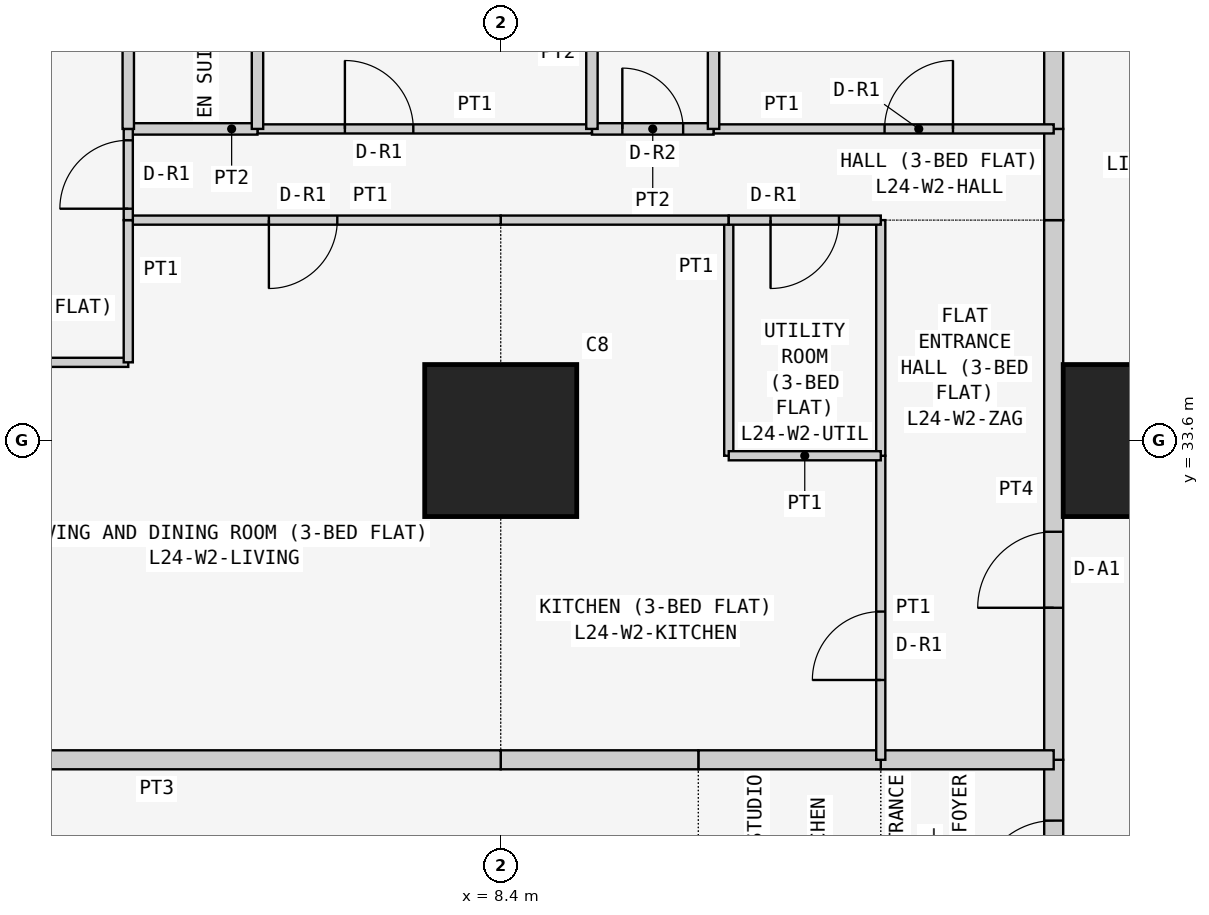
"""IFC4 building model, lengths in metres.
Left out: names, types, materials, properties, quantities, classifications, styles, units other than length and angle.
Written with IfcOpenShell. Run it as: python <this file> out.ifc"""

import sys

from ifc_helpers import new_model, si_unit, direction, frame, frame_2d, origin, origin_2d, place, context, subcontext, project, spatial, rectangle, extrude, element, fill, save


model = new_model("IFC4")
c1 = context("Model", 3, precision=1e-05, world=origin(), true_north=direction((0.0, 1.0)))
c2 = subcontext(c1, "Body", "Model", "MODEL_VIEW")
j1 = project(units=[si_unit("LENGTHUNIT", "METRE"), si_unit("PLANEANGLEUNIT", "RADIAN")], contexts=[c1])
p1 = place(None, origin())
s1 = spatial("IfcSite", under=j1, at=p1, CompositionType="ELEMENT")
p2 = place(p1, origin())
s2 = spatial("IfcBuilding", under=s1, at=p2, CompositionType="ELEMENT")
p3 = place(p2, frame((0.0, 0.0, 95.7)))
s3 = spatial("IfcBuildingStorey", under=s2, at=p3, CompositionType="ELEMENT", Elevation=95.7)
for number, where, z_axis, x_axis in (
    (1, (8.4, 33.6, 0.0), (0.0, 0.0, 1.0), (1.0, 0.0, 0.0)),
    (2, (16.8, 33.6, 0.0), (0.0, 0.0, 1.0), (1.0, 0.0, 0.0)),
):
    element("IfcColumn", number, at=place(p3, frame(where, z_axis=z_axis, x_axis=x_axis)), inside=s3, PredefinedType="COLUMN", context=c2, shape_type="SweptSolid", body=[
        extrude(rectangle(XDim=2.0, YDim=2.0, at=origin_2d()), origin(), (0.0, 0.0, 1.0), 3.6),
    ])
p4 = place(p3, frame((15.675, 26.8, 0.0), z_axis=(0.0, 0.0, 1.0), x_axis=(0.0, 1.0, 0.0)))
e3 = element("IfcWall", 3, at=p4, inside=s3, PredefinedType="PARTITIONING", context=c2, shape_type="SweptSolid", body=[
    extrude(rectangle(XDim=2.6, YDim=0.25, at=frame_2d((1.3, 0.0))), origin(), (0.0, 0.0, 1.0), 3.45),
])
p5 = place(p4, frame((0.8, 0.0, 0.0)))
e4 = element("IfcOpeningElement", 4, at=p5, cuts=e3, PredefinedType="OPENING", context=c2, shape_type="SweptSolid", body=[
    extrude(rectangle(XDim=1.0, YDim=2.1, at=frame_2d((0.5, 1.05))), frame((0.0, 0.135, 0.0), z_axis=(0.0, -1.0, 0.0), x_axis=(1.0, 0.0, 0.0)), (0.0, 0.0, 1.0), 0.27),
])
p6 = place(p3, frame((15.675, 29.4, 0.0), z_axis=(0.0, 0.0, 1.0), x_axis=(0.0, 1.0, 0.0)))
e5 = element("IfcWall", 5, at=p6, inside=s3, PredefinedType="PARTITIONING", context=c2, shape_type="SweptSolid", body=[
    extrude(rectangle(XDim=7.1, YDim=0.25, at=frame_2d((3.55, 0.0))), origin(), (0.0, 0.0, 1.0), 3.45),
])
p7 = place(p6, frame((2.0, 0.0, 0.0)))
e6 = element("IfcOpeningElement", 6, at=p7, cuts=e5, PredefinedType="OPENING", context=c2, shape_type="SweptSolid", body=[
    extrude(rectangle(XDim=1.0, YDim=2.1, at=frame_2d((0.5, 1.05))), frame((0.0, 0.135, 0.0), z_axis=(0.0, -1.0, 0.0), x_axis=(1.0, 0.0, 0.0)), (0.0, 0.0, 1.0), 0.27),
])
p8 = place(p3, frame((15.675, 36.5, 0.0), z_axis=(0.0, 0.0, 1.0), x_axis=(0.0, 1.0, 0.0)))
e7 = element("IfcWall", 7, at=p8, inside=s3, PredefinedType="PARTITIONING", context=c2, shape_type="SweptSolid", body=[
    extrude(rectangle(XDim=1.2, YDim=0.25, at=frame_2d((0.6, 0.0))), origin(), (0.0, 0.0, 1.0), 3.45),
])
p9 = place(p3, frame((15.675, 37.7, 0.0), z_axis=(0.0, 0.0, 1.0), x_axis=(0.0, 1.0, 0.0)))
e8 = element("IfcWall", 8, at=p9, inside=s3, PredefinedType="PARTITIONING", context=c2, shape_type="SweptSolid", body=[
    extrude(rectangle(XDim=5.0, YDim=0.25, at=frame_2d((2.5, 0.0))), origin(), (0.0, 0.0, 1.0), 3.45),
])
p10 = place(p3, frame((15.675, 29.4, 0.0), z_axis=(0.0, 0.0, 1.0), x_axis=(-1.0, 0.0, 0.0)))
e9 = element("IfcWall", 9, at=p10, inside=s3, PredefinedType="PARTITIONING", context=c2, shape_type="SweptSolid", body=[
    extrude(rectangle(XDim=2.275, YDim=0.25, at=frame_2d((1.138, 0.0))), origin(), (0.0, 0.0, 1.0), 3.45),
])
p11 = place(p3, frame((13.4, 29.4, 0.0), z_axis=(0.0, 0.0, 1.0), x_axis=(-1.0, 0.0, 0.0)))
e10 = element("IfcWall", 10, at=p11, inside=s3, PredefinedType="PARTITIONING", context=c2, shape_type="SweptSolid", body=[
    extrude(rectangle(XDim=2.4, YDim=0.25, at=frame_2d((1.2, 0.0))), origin(), (0.0, 0.0, 1.0), 3.45),
])
p12 = place(p3, frame((11.0, 29.4, 0.0), z_axis=(0.0, 0.0, 1.0), x_axis=(-1.0, 0.0, 0.0)))
e11 = element("IfcWall", 11, at=p12, inside=s3, PredefinedType="PARTITIONING", context=c2, shape_type="SweptSolid", body=[
    extrude(rectangle(XDim=2.6, YDim=0.25, at=frame_2d((1.3, 0.0))), origin(), (0.0, 0.0, 1.0), 3.45),
])
p13 = place(p3, frame((8.4, 29.4, 0.0), z_axis=(0.0, 0.0, 1.0), x_axis=(-1.0, 0.0, 0.0)))
e12 = element("IfcWall", 12, at=p13, inside=s3, PredefinedType="PARTITIONING", context=c2, shape_type="SweptSolid", body=[
    extrude(rectangle(XDim=9.05, YDim=0.25, at=frame_2d((4.525, 0.0))), origin(), (0.0, 0.0, 1.0), 3.45),
])
p14 = place(p3, frame((13.4, 29.4, 0.0), z_axis=(0.0, 0.0, 1.0), x_axis=(0.0, 1.0, 0.0)))
e13 = element("IfcWall", 13, at=p14, inside=s3, PredefinedType="PARTITIONING", context=c2, shape_type="SweptSolid", body=[
    extrude(rectangle(XDim=4.0, YDim=0.12, at=frame_2d((2.0, 0.0))), origin(), (0.0, 0.0, 1.0), 3.45),
])
p15 = place(p14, frame((1.05, 0.0, 0.0)))
e14 = element("IfcOpeningElement", 14, at=p15, cuts=e13, PredefinedType="OPENING", context=c2, shape_type="SweptSolid", body=[
    extrude(rectangle(XDim=0.9, YDim=2.1, at=frame_2d((0.45, 1.05))), frame((0.0, 0.07, 0.0), z_axis=(0.0, -1.0, 0.0), x_axis=(1.0, 0.0, 0.0)), (0.0, 0.0, 1.0), 0.14),
])
for number, where, z_axis, x_axis in (
    (15, (13.4, 33.4, 0.0), (0.0, 0.0, 1.0), (0.0, 1.0, 0.0)),
    (16, (11.4, 36.5, 0.0), (0.0, 0.0, 1.0), (0.0, -1.0, 0.0)),
):
    element("IfcWall", number, at=place(p3, frame(where, z_axis=z_axis, x_axis=x_axis)), inside=s3, PredefinedType="PARTITIONING", context=c2, shape_type="SweptSolid", body=[
        extrude(rectangle(XDim=3.1, YDim=0.12, at=frame_2d((1.55, 0.0))), origin(), (0.0, 0.0, 1.0), 3.45),
    ])
p16 = place(p3, frame((11.4, 33.4, 0.0), z_axis=(0.0, 0.0, 1.0), x_axis=(1.0, 0.0, 0.0)))
e17 = element("IfcWall", 17, at=p16, inside=s3, PredefinedType="PARTITIONING", context=c2, shape_type="SweptSolid", body=[
    extrude(rectangle(XDim=2.0, YDim=0.12, at=frame_2d((1.0, 0.0))), origin(), (0.0, 0.0, 1.0), 3.45),
])
p17 = place(p3, frame((8.4, 36.5, 0.0), z_axis=(0.0, 0.0, 1.0), x_axis=(1.0, 0.0, 0.0)))
e18 = element("IfcWall", 18, at=p17, inside=s3, PredefinedType="PARTITIONING", context=c2, shape_type="SweptSolid", body=[
    extrude(rectangle(XDim=3.0, YDim=0.12, at=frame_2d((1.5, 0.0))), origin(), (0.0, 0.0, 1.0), 3.45),
])
p18 = place(p3, frame((11.4, 36.5, 0.0), z_axis=(0.0, 0.0, 1.0), x_axis=(1.0, 0.0, 0.0)))
e19 = element("IfcWall", 19, at=p18, inside=s3, PredefinedType="PARTITIONING", context=c2, shape_type="SweptSolid", body=[
    extrude(rectangle(XDim=2.0, YDim=0.12, at=frame_2d((1.0, 0.0))), origin(), (0.0, 0.0, 1.0), 3.45),
])
p19 = place(p18, frame((0.55, 0.0, 0.0)))
e20 = element("IfcOpeningElement", 20, at=p19, cuts=e19, PredefinedType="OPENING", context=c2, shape_type="SweptSolid", body=[
    extrude(rectangle(XDim=0.9, YDim=2.1, at=frame_2d((0.45, 1.05))), frame((0.0, 0.07, 0.0), z_axis=(0.0, -1.0, 0.0), x_axis=(1.0, 0.0, 0.0)), (0.0, 0.0, 1.0), 0.14),
])
p20 = place(p3, frame((3.5, 36.5, 0.0), z_axis=(0.0, 0.0, 1.0), x_axis=(1.0, 0.0, 0.0)))
e21 = element("IfcWall", 21, at=p20, inside=s3, PredefinedType="PARTITIONING", context=c2, shape_type="SweptSolid", body=[
    extrude(rectangle(XDim=4.9, YDim=0.12, at=frame_2d((2.45, 0.0))), origin(), (0.0, 0.0, 1.0), 3.45),
])
p21 = place(p20, frame((1.85, 0.0, 0.0)))
e22 = element("IfcOpeningElement", 22, at=p21, cuts=e21, PredefinedType="OPENING", context=c2, shape_type="SweptSolid", body=[
    extrude(rectangle(XDim=0.9, YDim=2.1, at=frame_2d((0.45, 1.05))), frame((0.0, 0.07, 0.0), z_axis=(0.0, -1.0, 0.0), x_axis=(1.0, 0.0, 0.0)), (0.0, 0.0, 1.0), 0.14),
])
p22 = place(p3, frame((-0.65, 34.629, 0.0), z_axis=(0.0, 0.0, 1.0), x_axis=(1.0, 0.0, 0.0)))
e23 = element("IfcWall", 23, at=p22, inside=s3, PredefinedType="PARTITIONING", context=c2, shape_type="SweptSolid", body=[
    extrude(rectangle(XDim=4.15, YDim=0.12, at=frame_2d((2.075, 0.0))), origin(), (0.0, 0.0, 1.0), 3.45),
])
p23 = place(p3, frame((3.5, 34.629, 0.0), z_axis=(0.0, 0.0, 1.0), x_axis=(0.0, 1.0, 0.0)))
e24 = element("IfcWall", 24, at=p23, inside=s3, PredefinedType="PARTITIONING", context=c2, shape_type="SweptSolid", body=[
    extrude(rectangle(XDim=1.871, YDim=0.12, at=frame_2d((0.936, 0.0))), origin(), (0.0, 0.0, 1.0), 3.45),
])
p24 = place(p3, frame((11.2, 37.7, 0.0), z_axis=(0.0, 0.0, 1.0), x_axis=(1.0, 0.0, 0.0)))
e25 = element("IfcWall", 25, at=p24, inside=s3, PredefinedType="PARTITIONING", context=c2, shape_type="SweptSolid", body=[
    extrude(rectangle(XDim=4.475, YDim=0.12, at=frame_2d((2.238, 0.0))), origin(), (0.0, 0.0, 1.0), 3.45),
])
p25 = place(p24, frame((2.25, 0.0, 0.0)))
e26 = element("IfcOpeningElement", 26, at=p25, cuts=e25, PredefinedType="OPENING", context=c2, shape_type="SweptSolid", body=[
    extrude(rectangle(XDim=0.9, YDim=2.1, at=frame_2d((0.45, 1.05))), frame((0.0, 0.07, 0.0), z_axis=(0.0, -1.0, 0.0), x_axis=(1.0, 0.0, 0.0)), (0.0, 0.0, 1.0), 0.14),
])
p26 = place(p3, frame((9.6, 37.7, 0.0), z_axis=(0.0, 0.0, 1.0), x_axis=(1.0, 0.0, 0.0)))
e27 = element("IfcWall", 27, at=p26, inside=s3, PredefinedType="PARTITIONING", context=c2, shape_type="SweptSolid", body=[
    extrude(rectangle(XDim=1.6, YDim=0.15, at=frame_2d((0.8, 0.0))), origin(), (0.0, 0.0, 1.0), 3.45),
])
p27 = place(p26, frame((0.4, 0.0, 0.0)))
e28 = element("IfcOpeningElement", 28, at=p27, cuts=e27, PredefinedType="OPENING", context=c2, shape_type="SweptSolid", body=[
    extrude(rectangle(XDim=0.8, YDim=2.1, at=frame_2d((0.4, 1.05))), frame((0.0, 0.085, 0.0), z_axis=(0.0, -1.0, 0.0), x_axis=(1.0, 0.0, 0.0)), (0.0, 0.0, 1.0), 0.17),
])
p28 = place(p3, frame((5.2, 37.7, 0.0), z_axis=(0.0, 0.0, 1.0), x_axis=(1.0, 0.0, 0.0)))
e29 = element("IfcWall", 29, at=p28, inside=s3, PredefinedType="PARTITIONING", context=c2, shape_type="SweptSolid", body=[
    extrude(rectangle(XDim=4.4, YDim=0.12, at=frame_2d((2.2, 0.0))), origin(), (0.0, 0.0, 1.0), 3.45),
])
p29 = place(p28, frame((1.15, 0.0, 0.0)))
e30 = element("IfcOpeningElement", 30, at=p29, cuts=e29, PredefinedType="OPENING", context=c2, shape_type="SweptSolid", body=[
    extrude(rectangle(XDim=0.9, YDim=2.1, at=frame_2d((0.45, 1.05))), frame((0.0, 0.07, 0.0), z_axis=(0.0, -1.0, 0.0), x_axis=(1.0, 0.0, 0.0)), (0.0, 0.0, 1.0), 0.14),
])
p30 = place(p3, frame((3.5, 37.7, 0.0), z_axis=(0.0, 0.0, 1.0), x_axis=(1.0, 0.0, 0.0)))
e31 = element("IfcWall", 31, at=p30, inside=s3, PredefinedType="PARTITIONING", context=c2, shape_type="SweptSolid", body=[
    extrude(rectangle(XDim=1.7, YDim=0.15, at=frame_2d((0.85, 0.0))), origin(), (0.0, 0.0, 1.0), 3.45),
])
p31 = place(p3, frame((3.5, 36.5, 0.0), z_axis=(0.0, 0.0, 1.0), x_axis=(0.0, 1.0, 0.0)))
e32 = element("IfcWall", 32, at=p31, inside=s3, PredefinedType="PARTITIONING", context=c2, shape_type="SweptSolid", body=[
    extrude(rectangle(XDim=1.2, YDim=0.12, at=frame_2d((0.6, 0.0))), origin(), (0.0, 0.0, 1.0), 3.45),
])
p32 = place(p31, frame((0.15, 0.0, 0.0)))
e33 = element("IfcOpeningElement", 33, at=p32, cuts=e32, PredefinedType="OPENING", context=c2, shape_type="SweptSolid", body=[
    extrude(rectangle(XDim=0.9, YDim=2.1, at=frame_2d((0.45, 1.05))), frame((0.0, 0.07, 0.0), z_axis=(0.0, -1.0, 0.0), x_axis=(1.0, 0.0, 0.0)), (0.0, 0.0, 1.0), 0.14),
])
for number, where, z_axis, x_axis in (
    (34, (11.2, 37.7, 0.0), (0.0, 0.0, 1.0), (0.0, 1.0, 0.0)),
    (35, (9.6, 37.7, 0.0), (0.0, 0.0, 1.0), (0.0, 1.0, 0.0)),
    (36, (5.2, 37.7, 0.0), (0.0, 0.0, 1.0), (0.0, 1.0, 0.0)),
):
    element("IfcWall", number, at=place(p3, frame(where, z_axis=z_axis, x_axis=x_axis)), inside=s3, PredefinedType="PARTITIONING", context=c2, shape_type="SweptSolid", body=[
        extrude(rectangle(XDim=5.0, YDim=0.15, at=frame_2d((2.5, 0.0))), origin(), (0.0, 0.0, 1.0), 3.45),
    ])
p33 = place(p3, frame((3.5, 37.7, 0.0), z_axis=(0.0, 0.0, 1.0), x_axis=(0.0, 1.0, 0.0)))
e37 = element("IfcWall", 37, at=p33, inside=s3, PredefinedType="PARTITIONING", context=c2, shape_type="SweptSolid", body=[
    extrude(rectangle(XDim=5.0, YDim=0.15, at=frame_2d((2.5, 0.0))), origin(), (0.0, 0.0, 1.0), 3.45),
])
p34 = place(p33, frame((2.3, 0.0, 0.0)))
e38 = element("IfcOpeningElement", 38, at=p34, cuts=e37, PredefinedType="OPENING", context=c2, shape_type="SweptSolid", body=[
    extrude(rectangle(XDim=0.8, YDim=2.1, at=frame_2d((0.4, 1.05))), frame((0.0, 0.085, 0.0), z_axis=(0.0, -1.0, 0.0), x_axis=(1.0, 0.0, 0.0)), (0.0, 0.0, 1.0), 0.17),
])
p35 = place(p5, origin())
e39 = element("IfcDoor", 39, at=p35, inside=s3, OperationType="SINGLE_SWING_LEFT", PredefinedType="DOOR", context=c2, shape_type="SweptSolid", body=[
    extrude(rectangle(XDim=1.0, YDim=2.1, at=frame_2d((0.5, 1.05))), frame((0.0, 0.025, 0.0), z_axis=(0.0, -1.0, 0.0), x_axis=(1.0, 0.0, 0.0)), (0.0, 0.0, 1.0), 0.05),
])
fill(e4, e39)
p36 = place(p7, origin())
e40 = element("IfcDoor", 40, at=p36, inside=s3, OperationType="SINGLE_SWING_LEFT", PredefinedType="DOOR", context=c2, shape_type="SweptSolid", body=[
    extrude(rectangle(XDim=1.0, YDim=2.1, at=frame_2d((0.5, 1.05))), frame((0.0, 0.025, 0.0), z_axis=(0.0, -1.0, 0.0), x_axis=(1.0, 0.0, 0.0)), (0.0, 0.0, 1.0), 0.05),
])
fill(e6, e40)
p37 = place(p15, origin())
e41 = element("IfcDoor", 41, at=p37, inside=s3, OperationType="SINGLE_SWING_LEFT", PredefinedType="DOOR", context=c2, shape_type="SweptSolid", body=[
    extrude(rectangle(XDim=0.9, YDim=2.1, at=frame_2d((0.45, 1.05))), frame((0.0, 0.025, 0.0), z_axis=(0.0, -1.0, 0.0), x_axis=(1.0, 0.0, 0.0)), (0.0, 0.0, 1.0), 0.05),
])
fill(e14, e41)
p38 = place(p19, frame((0.9, 0.0, 0.0), z_axis=(0.0, 0.0, 1.0), x_axis=(-1.0, 0.0, 0.0)))
e42 = element("IfcDoor", 42, at=p38, inside=s3, OperationType="SINGLE_SWING_RIGHT", PredefinedType="DOOR", context=c2, shape_type="SweptSolid", body=[
    extrude(rectangle(XDim=0.9, YDim=2.1, at=frame_2d((0.45, 1.05))), frame((0.0, 0.025, 0.0), z_axis=(0.0, -1.0, 0.0), x_axis=(1.0, 0.0, 0.0)), (0.0, 0.0, 1.0), 0.05),
])
fill(e20, e42)
p39 = place(p21, frame((0.9, 0.0, 0.0), z_axis=(0.0, 0.0, 1.0), x_axis=(-1.0, 0.0, 0.0)))
e43 = element("IfcDoor", 43, at=p39, inside=s3, OperationType="SINGLE_SWING_RIGHT", PredefinedType="DOOR", context=c2, shape_type="SweptSolid", body=[
    extrude(rectangle(XDim=0.9, YDim=2.1, at=frame_2d((0.45, 1.05))), frame((0.0, 0.025, 0.0), z_axis=(0.0, -1.0, 0.0), x_axis=(1.0, 0.0, 0.0)), (0.0, 0.0, 1.0), 0.05),
])
fill(e22, e43)
p40 = place(p25, origin())
e44 = element("IfcDoor", 44, at=p40, inside=s3, OperationType="SINGLE_SWING_RIGHT", PredefinedType="DOOR", context=c2, shape_type="SweptSolid", body=[
    extrude(rectangle(XDim=0.9, YDim=2.1, at=frame_2d((0.45, 1.05))), frame((0.0, 0.025, 0.0), z_axis=(0.0, -1.0, 0.0), x_axis=(1.0, 0.0, 0.0)), (0.0, 0.0, 1.0), 0.05),
])
fill(e26, e44)
p41 = place(p27, origin())
e45 = element("IfcDoor", 45, at=p41, inside=s3, OperationType="SINGLE_SWING_LEFT", PredefinedType="DOOR", context=c2, shape_type="SweptSolid", body=[
    extrude(rectangle(XDim=0.8, YDim=2.1, at=frame_2d((0.4, 1.05))), frame((0.0, 0.025, 0.0), z_axis=(0.0, -1.0, 0.0), x_axis=(1.0, 0.0, 0.0)), (0.0, 0.0, 1.0), 0.05),
])
fill(e28, e45)
p42 = place(p29, origin())
e46 = element("IfcDoor", 46, at=p42, inside=s3, OperationType="SINGLE_SWING_LEFT", PredefinedType="DOOR", context=c2, shape_type="SweptSolid", body=[
    extrude(rectangle(XDim=0.9, YDim=2.1, at=frame_2d((0.45, 1.05))), frame((0.0, 0.025, 0.0), z_axis=(0.0, -1.0, 0.0), x_axis=(1.0, 0.0, 0.0)), (0.0, 0.0, 1.0), 0.05),
])
fill(e30, e46)
p43 = place(p32, origin())
e47 = element("IfcDoor", 47, at=p43, inside=s3, OperationType="SINGLE_SWING_LEFT", PredefinedType="DOOR", context=c2, shape_type="SweptSolid", body=[
    extrude(rectangle(XDim=0.9, YDim=2.1, at=frame_2d((0.45, 1.05))), frame((0.0, 0.025, 0.0), z_axis=(0.0, -1.0, 0.0), x_axis=(1.0, 0.0, 0.0)), (0.0, 0.0, 1.0), 0.05),
])
fill(e33, e47)
save(model, sys.argv[1])
